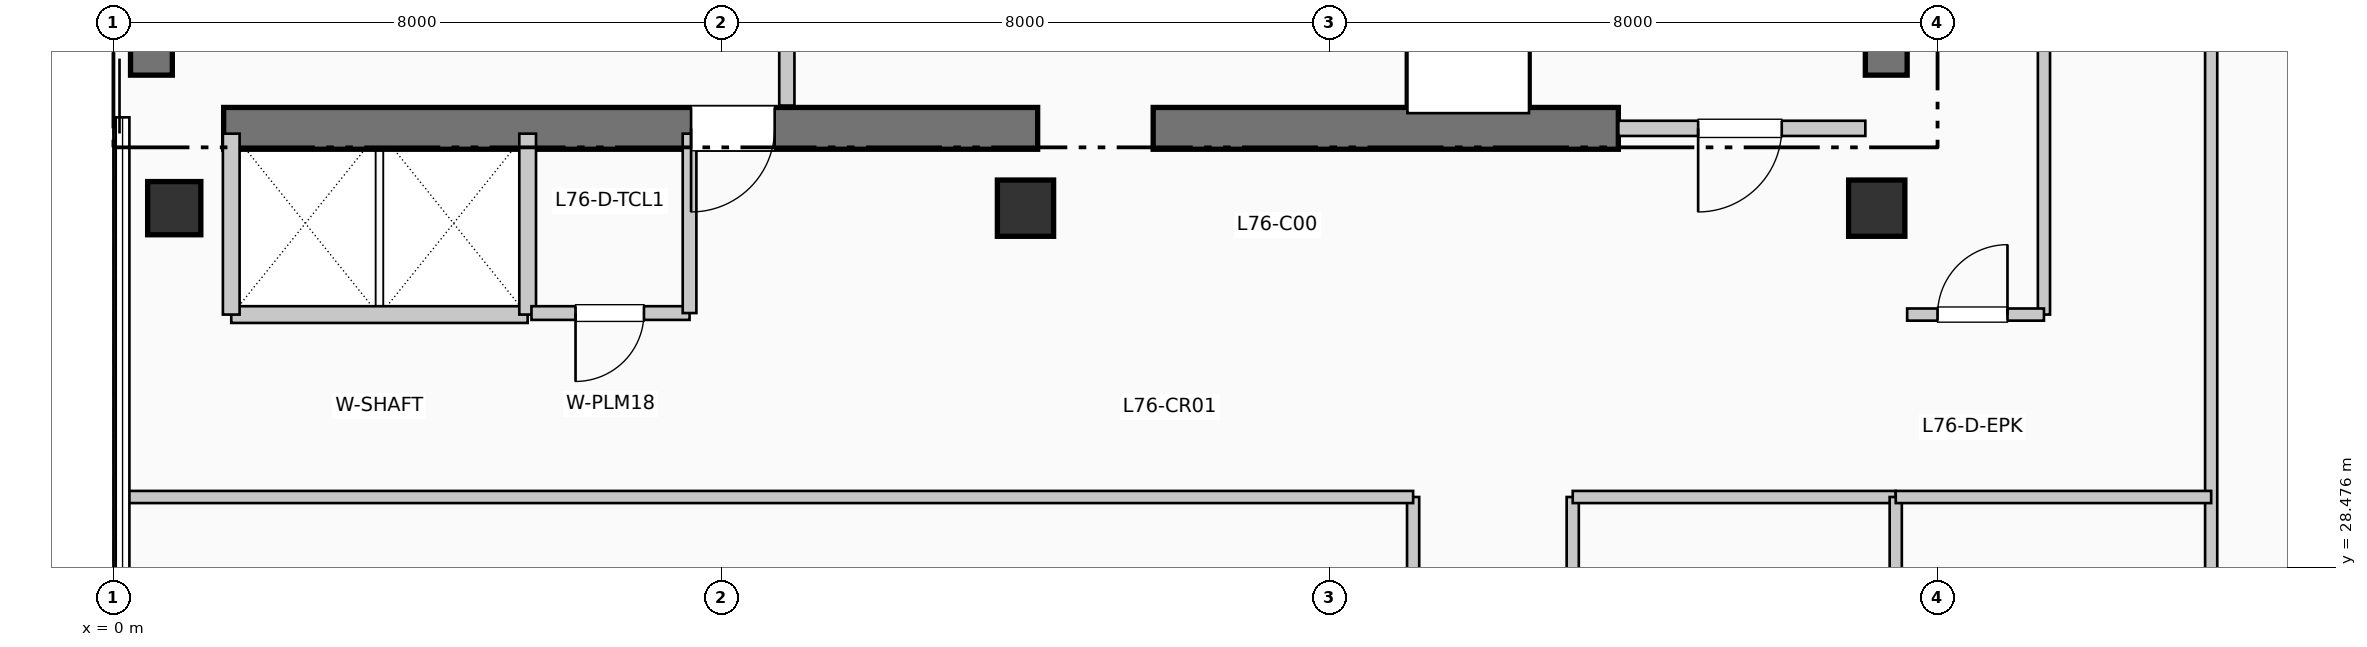
"""IFC4 building model, lengths in metres.
Left out: names, types, materials, properties, quantities, classifications, styles, units other than length and angle.
Written with IfcOpenShell. Run it as: python <this file> out.ifc"""

import sys

from ifc_helpers import new_model, si_unit, direction, frame, frame_2d, origin, origin_2d, place, context, subcontext, project, spatial, rectangle, extrude, element, fill, save


model = new_model("IFC4")
c1 = context("Model", 3, precision=1e-05, world=origin(), true_north=direction((0.0, 1.0)))
c2 = subcontext(c1, "Body", "Model", "MODEL_VIEW")
j1 = project(units=[si_unit("LENGTHUNIT", "METRE"), si_unit("PLANEANGLEUNIT", "RADIAN")], contexts=[c1])
p1 = place(None, origin())
s1 = spatial("IfcSite", under=j1, at=p1, CompositionType="ELEMENT")
p2 = place(p1, origin())
s2 = spatial("IfcBuilding", under=s1, at=p2, CompositionType="ELEMENT")
p3 = place(p2, frame((0.0, 0.0, 311.85)))
s3 = spatial("IfcBuildingStorey", under=s2, at=p3, CompositionType="ELEMENT", Elevation=311.85)
p4 = place(p3, frame((0.5, 34.95, 0.0), z_axis=(0.0, 0.0, 1.0), x_axis=(0.0, 1.0, 0.0)))
e1 = element("IfcWall", 1, at=p4, inside=s3, PredefinedType="SHEAR", context=c2, shape_type="SweptSolid", body=[
    extrude(rectangle(XDim=7.9, YDim=0.55, at=frame_2d((3.95, 0.0))), origin(), (0.0, 0.0, 1.0), 3.96),
])
p5 = place(p3, frame((23.325, 34.95, 0.0), z_axis=(0.0, 0.0, 1.0), x_axis=(0.0, 1.0, 0.0)))
e2 = element("IfcWall", 2, at=p5, inside=s3, PredefinedType="SHEAR", context=c2, shape_type="SweptSolid", body=[
    extrude(rectangle(XDim=10.64, YDim=0.55, at=frame_2d((5.32, 0.0))), origin(), (0.0, 0.0, 1.0), 3.96),
])
p6 = place(p3, frame((1.45, 34.25, 0.0), z_axis=(0.0, 0.0, 1.0), x_axis=(1.0, 0.0, 0.0)))
e3 = element("IfcWall", 3, at=p6, inside=s3, PredefinedType="SHEAR", context=c2, shape_type="SweptSolid", body=[
    extrude(rectangle(XDim=10.71, YDim=0.55, at=frame_2d((5.355, 0.0))), origin(), (0.0, 0.0, 1.0), 3.96),
])
p7 = place(p6, frame((7.25, 0.0, 0.0), z_axis=(0.0, 0.0, 1.0), x_axis=(-1.0, 0.0, 0.0)))
e4 = element("IfcOpeningElement", 4, at=p7, cuts=e3, PredefinedType="OPENING", context=c2, shape_type="SweptSolid", body=[
    extrude(rectangle(XDim=1.1, YDim=2.15, at=frame_2d((0.55, 1.075))), frame((0.0, 0.285, 0.0), z_axis=(0.0, -1.0, 0.0), x_axis=(1.0, 0.0, 0.0)), (0.0, 0.0, 1.0), 0.57),
])
p8 = place(p3, frame((13.68, 34.25, 0.0), z_axis=(0.0, 0.0, 1.0), x_axis=(1.0, 0.0, 0.0)))
e5 = element("IfcWall", 5, at=p8, inside=s3, PredefinedType="SHEAR", context=c2, shape_type="SweptSolid", body=[
    extrude(rectangle(XDim=6.12, YDim=0.55, at=frame_2d((3.06, 0.0))), origin(), (0.0, 0.0, 1.0), 3.96),
])
p9 = place(p3, frame((0.8, 33.2, 0.0), z_axis=(0.0, 0.0, 1.0), x_axis=(1.0, 0.0, 0.0)))
e6 = element("IfcColumn", 6, at=p9, inside=s3, PredefinedType="COLUMN", context=c2, shape_type="SweptSolid", body=[
    extrude(rectangle(XDim=0.7, YDim=0.7, at=origin_2d()), origin(), (0.0, 0.0, 1.0), 3.96),
])
for number, where, z_axis, x_axis in (
    (7, (12.0, 33.2, 0.0), (0.0, 0.0, 1.0), (1.0, 0.0, 0.0)),
    (8, (23.2, 33.2, 0.0), (0.0, 0.0, 1.0), (1.0, 0.0, 0.0)),
):
    element("IfcColumn", number, at=place(p3, frame(where, z_axis=z_axis, x_axis=x_axis)), inside=s3, PredefinedType="COLUMN", context=c2, shape_type="SweptSolid", body=[
        extrude(rectangle(XDim=0.74, YDim=0.74, at=origin_2d()), origin(), (0.0, 0.0, 1.0), 3.96),
    ])
p10 = place(p3, frame((8.86, 34.55, 0.0), z_axis=(0.0, 0.0, 1.0), x_axis=(0.0, 1.0, 0.0)))
e9 = element("IfcWall", 9, at=p10, inside=s3, PredefinedType="PARTITIONING", context=c2, shape_type="SweptSolid", body=[
    extrude(rectangle(XDim=2.5, YDim=0.2, at=frame_2d((1.25, 0.0))), origin(), (0.0, 0.0, 1.0), 3.74),
])
p11 = place(p3, frame((19.8, 34.25, 0.0), z_axis=(0.0, 0.0, 1.0), x_axis=(1.0, 0.0, 0.0)))
e10 = element("IfcWall", 10, at=p11, inside=s3, PredefinedType="PARTITIONING", context=c2, shape_type="SweptSolid", body=[
    extrude(rectangle(XDim=3.25, YDim=0.2, at=frame_2d((1.625, 0.0))), origin(), (0.0, 0.0, 1.0), 3.74),
])
p12 = place(p11, frame((2.15, 0.0, 0.0), z_axis=(0.0, 0.0, 1.0), x_axis=(-1.0, 0.0, 0.0)))
e11 = element("IfcOpeningElement", 11, at=p12, cuts=e10, PredefinedType="OPENING", context=c2, shape_type="SweptSolid", body=[
    extrude(rectangle(XDim=1.1, YDim=2.15, at=frame_2d((0.55, 1.075))), frame((0.0, 0.11, 0.0), z_axis=(0.0, -1.0, 0.0), x_axis=(1.0, 0.0, 0.0)), (0.0, 0.0, 1.0), 0.22),
])
p13 = place(p3, frame((1.55, 31.8, 0.0), z_axis=(0.0, 0.0, 1.0), x_axis=(1.0, 0.0, 0.0)))
e12 = element("IfcWall", 12, at=p13, inside=s3, PredefinedType="PARTITIONING", context=c2, shape_type="SweptSolid", body=[
    extrude(rectangle(XDim=3.9, YDim=0.22, at=frame_2d((1.95, 0.0))), origin(), (0.0, 0.0, 1.0), 3.74),
])
for number, where, z_axis, x_axis in (
    (13, (1.55, 31.8, 0.0), (0.0, 0.0, 1.0), (0.0, 1.0, 0.0)),
    (14, (5.45, 31.8, 0.0), (0.0, 0.0, 1.0), (0.0, 1.0, 0.0)),
):
    element("IfcWall", number, at=place(p3, frame(where, z_axis=z_axis, x_axis=x_axis)), inside=s3, PredefinedType="PARTITIONING", context=c2, shape_type="SweptSolid", body=[
        extrude(rectangle(XDim=2.38, YDim=0.22, at=frame_2d((1.19, 0.0))), origin(), (0.0, 0.0, 1.0), 3.74),
    ])
p14 = place(p3, frame((5.5, 31.82, 0.0), z_axis=(0.0, 0.0, 1.0), x_axis=(1.0, 0.0, 0.0)))
e15 = element("IfcWall", 15, at=p14, inside=s3, PredefinedType="PLUMBINGWALL", context=c2, shape_type="SweptSolid", body=[
    extrude(rectangle(XDim=2.08, YDim=0.18, at=frame_2d((1.04, 0.0))), origin(), (0.0, 0.0, 1.0), 3.74),
])
p15 = place(p14, frame((1.48, 0.0, 0.0), z_axis=(0.0, 0.0, 1.0), x_axis=(-1.0, 0.0, 0.0)))
e16 = element("IfcOpeningElement", 16, at=p15, cuts=e15, PredefinedType="OPENING", context=c2, shape_type="SweptSolid", body=[
    extrude(rectangle(XDim=0.9, YDim=2.1, at=frame_2d((0.45, 1.05))), frame((0.0, 0.1, 0.0), z_axis=(0.0, -1.0, 0.0), x_axis=(1.0, 0.0, 0.0)), (0.0, 0.0, 1.0), 0.2),
])
p16 = place(p3, frame((7.58, 31.82, 0.0), z_axis=(0.0, 0.0, 1.0), x_axis=(0.0, 1.0, 0.0)))
e17 = element("IfcWall", 17, at=p16, inside=s3, PredefinedType="PLUMBINGWALL", context=c2, shape_type="SweptSolid", body=[
    extrude(rectangle(XDim=2.36, YDim=0.18, at=frame_2d((1.18, 0.0))), origin(), (0.0, 0.0, 1.0), 3.74),
])
p17 = place(p3, frame((17.1, 11.04, 0.0), z_axis=(0.0, 0.0, 1.0), x_axis=(0.0, 1.0, 0.0)))
e18 = element("IfcWall", 18, at=p17, inside=s3, PredefinedType="PARTITIONING", context=c2, shape_type="SweptSolid", body=[
    extrude(rectangle(XDim=18.36, YDim=0.16, at=frame_2d((9.18, 0.0))), origin(), (0.0, 0.0, 1.0), 3.74),
])
p18 = place(p17, frame((2.311, 0.0, 0.0), z_axis=(0.0, 0.0, 1.0), x_axis=(-1.0, 0.0, 0.0)))
e19 = element("IfcOpeningElement", 19, at=p18, cuts=e18, PredefinedType="OPENING", context=c2, shape_type="SweptSolid", body=[
    extrude(rectangle(XDim=0.95, YDim=2.15, at=frame_2d((0.475, 1.075))), frame((0.0, 0.09, 0.0), z_axis=(0.0, -1.0, 0.0), x_axis=(1.0, 0.0, 0.0)), (0.0, 0.0, 1.0), 0.18),
])
p19 = place(p17, frame((6.167, 0.0, 0.0), z_axis=(0.0, 0.0, 1.0), x_axis=(-1.0, 0.0, 0.0)))
e20 = element("IfcOpeningElement", 20, at=p19, cuts=e18, PredefinedType="OPENING", context=c2, shape_type="SweptSolid", body=[
    extrude(rectangle(XDim=0.95, YDim=2.15, at=frame_2d((0.475, 1.075))), frame((0.0, 0.09, 0.0), z_axis=(0.0, -1.0, 0.0), x_axis=(1.0, 0.0, 0.0)), (0.0, 0.0, 1.0), 0.18),
])
p20 = place(p17, frame((10.298, 0.0, 0.0), z_axis=(0.0, 0.0, 1.0), x_axis=(-1.0, 0.0, 0.0)))
e21 = element("IfcOpeningElement", 21, at=p20, cuts=e18, PredefinedType="OPENING", context=c2, shape_type="SweptSolid", body=[
    extrude(rectangle(XDim=0.95, YDim=2.15, at=frame_2d((0.475, 1.075))), frame((0.0, 0.09, 0.0), z_axis=(0.0, -1.0, 0.0), x_axis=(1.0, 0.0, 0.0)), (0.0, 0.0, 1.0), 0.18),
])
p21 = place(p17, frame((14.153, 0.0, 0.0), z_axis=(0.0, 0.0, 1.0), x_axis=(-1.0, 0.0, 0.0)))
e22 = element("IfcOpeningElement", 22, at=p21, cuts=e18, PredefinedType="OPENING", context=c2, shape_type="SweptSolid", body=[
    extrude(rectangle(XDim=0.95, YDim=2.15, at=frame_2d((0.475, 1.075))), frame((0.0, 0.09, 0.0), z_axis=(0.0, -1.0, 0.0), x_axis=(1.0, 0.0, 0.0)), (0.0, 0.0, 1.0), 0.18),
])
p22 = place(p17, frame((17.366, 0.0, 0.0), z_axis=(0.0, 0.0, 1.0), x_axis=(-1.0, 0.0, 0.0)))
e23 = element("IfcOpeningElement", 23, at=p22, cuts=e18, PredefinedType="OPENING", context=c2, shape_type="SweptSolid", body=[
    extrude(rectangle(XDim=0.95, YDim=2.15, at=frame_2d((0.475, 1.075))), frame((0.0, 0.09, 0.0), z_axis=(0.0, -1.0, 0.0), x_axis=(1.0, 0.0, 0.0)), (0.0, 0.0, 1.0), 0.18),
])
p23 = place(p3, frame((19.2, 11.04, 0.0), z_axis=(0.0, 0.0, 1.0), x_axis=(0.0, 1.0, 0.0)))
e24 = element("IfcWall", 24, at=p23, inside=s3, PredefinedType="PARTITIONING", context=c2, shape_type="SweptSolid", body=[
    extrude(rectangle(XDim=18.36, YDim=0.16, at=frame_2d((9.18, 0.0))), origin(), (0.0, 0.0, 1.0), 3.74),
])
p24 = place(p23, frame((8.705, 0.0, 0.0)))
e25 = element("IfcOpeningElement", 25, at=p24, cuts=e24, PredefinedType="OPENING", context=c2, shape_type="SweptSolid", body=[
    extrude(rectangle(XDim=0.95, YDim=2.15, at=frame_2d((0.475, 1.075))), frame((0.0, 0.09, 0.0), z_axis=(0.0, -1.0, 0.0), x_axis=(1.0, 0.0, 0.0)), (0.0, 0.0, 1.0), 0.18),
])
p25 = place(p3, frame((0.19, 29.4, 0.0), z_axis=(0.0, 0.0, 1.0), x_axis=(1.0, 0.0, 0.0)))
e26 = element("IfcWall", 26, at=p25, inside=s3, PredefinedType="PARTITIONING", context=c2, shape_type="SweptSolid", body=[
    extrude(rectangle(XDim=16.91, YDim=0.16, at=frame_2d((8.455, 0.0))), origin(), (0.0, 0.0, 1.0), 3.425),
])
p26 = place(p3, frame((19.2, 29.4, 0.0), z_axis=(0.0, 0.0, 1.0), x_axis=(1.0, 0.0, 0.0)))
e27 = element("IfcWall", 27, at=p26, inside=s3, PredefinedType="PARTITIONING", context=c2, shape_type="SweptSolid", body=[
    extrude(rectangle(XDim=4.25, YDim=0.16, at=frame_2d((2.125, 0.0))), origin(), (0.0, 0.0, 1.0), 3.425),
])
p27 = place(p3, frame((23.45, 6.84, 0.0), z_axis=(0.0, 0.0, 1.0), x_axis=(0.0, 1.0, 0.0)))
e28 = element("IfcWall", 28, at=p27, inside=s3, PredefinedType="PARTITIONING", context=c2, shape_type="SweptSolid", body=[
    extrude(rectangle(XDim=22.56, YDim=0.16, at=frame_2d((11.28, 0.0))), origin(), (0.0, 0.0, 1.0), 3.175),
])
p28 = place(p3, frame((25.4, 31.8, 0.0), z_axis=(0.0, 0.0, 1.0), x_axis=(0.0, 1.0, 0.0)))
e29 = element("IfcWall", 29, at=p28, inside=s3, PredefinedType="PARTITIONING", context=c2, shape_type="SweptSolid", body=[
    extrude(rectangle(XDim=14.01, YDim=0.16, at=frame_2d((7.005, 0.0))), origin(), (0.0, 0.0, 1.0), 3.74),
])
p29 = place(p3, frame((27.6, 25.19, 0.0), z_axis=(0.0, 0.0, 1.0), x_axis=(0.0, 1.0, 0.0)))
e30 = element("IfcWall", 30, at=p29, inside=s3, PredefinedType="PARTITIONING", context=c2, shape_type="SweptSolid", body=[
    extrude(rectangle(XDim=12.01, YDim=0.16, at=frame_2d((6.005, 0.0))), origin(), (0.0, 0.0, 1.0), 3.74),
])
p30 = place(p29, frame((2.15, 0.0, 0.0), z_axis=(0.0, 0.0, 1.0), x_axis=(-1.0, 0.0, 0.0)))
e31 = element("IfcOpeningElement", 31, at=p30, cuts=e30, PredefinedType="OPENING", context=c2, shape_type="SweptSolid", body=[
    extrude(rectangle(XDim=0.95, YDim=2.15, at=frame_2d((0.475, 1.075))), frame((0.0, 0.09, 0.0), z_axis=(0.0, -1.0, 0.0), x_axis=(1.0, 0.0, 0.0)), (0.0, 0.0, 1.0), 0.18),
])
p31 = place(p3, frame((23.45, 29.4, 0.0), z_axis=(0.0, 0.0, 1.0), x_axis=(1.0, 0.0, 0.0)))
e32 = element("IfcWall", 32, at=p31, inside=s3, PredefinedType="PARTITIONING", context=c2, shape_type="SweptSolid", body=[
    extrude(rectangle(XDim=4.15, YDim=0.16, at=frame_2d((2.075, 0.0))), origin(), (0.0, 0.0, 1.0), 3.425),
])
p32 = place(p3, frame((23.6, 31.8, 0.0), z_axis=(0.0, 0.0, 1.0), x_axis=(1.0, 0.0, 0.0)))
e33 = element("IfcWall", 33, at=p32, inside=s3, PredefinedType="PARTITIONING", context=c2, shape_type="SweptSolid", body=[
    extrude(rectangle(XDim=1.8, YDim=0.16, at=frame_2d((0.9, 0.0))), origin(), (0.0, 0.0, 1.0), 3.74),
])
p33 = place(p32, frame((0.4, 0.0, 0.0)))
e34 = element("IfcOpeningElement", 34, at=p33, cuts=e33, PredefinedType="OPENING", context=c2, shape_type="SweptSolid", body=[
    extrude(rectangle(XDim=0.92, YDim=2.1, at=frame_2d((0.46, 1.05))), frame((0.0, 0.09, 0.0), z_axis=(0.0, -1.0, 0.0), x_axis=(1.0, 0.0, 0.0)), (0.0, 0.0, 1.0), 0.18),
])
p34 = place(p7, origin())
e35 = element("IfcDoor", 35, at=p34, inside=s3, OperationType="SINGLE_SWING_LEFT", PredefinedType="DOOR", context=c2, shape_type="SweptSolid", body=[
    extrude(rectangle(XDim=1.1, YDim=2.15, at=frame_2d((0.55, 1.075))), frame((0.0, 0.025, 0.0), z_axis=(0.0, -1.0, 0.0), x_axis=(1.0, 0.0, 0.0)), (0.0, 0.0, 1.0), 0.05),
])
fill(e4, e35)
p35 = place(p12, origin())
e36 = element("IfcDoor", 36, at=p35, inside=s3, OperationType="SINGLE_SWING_LEFT", PredefinedType="DOOR", context=c2, shape_type="SweptSolid", body=[
    extrude(rectangle(XDim=1.1, YDim=2.15, at=frame_2d((0.55, 1.075))), frame((0.0, 0.025, 0.0), z_axis=(0.0, -1.0, 0.0), x_axis=(1.0, 0.0, 0.0)), (0.0, 0.0, 1.0), 0.05),
])
fill(e11, e36)
p36 = place(p15, origin())
e37 = element("IfcDoor", 37, at=p36, inside=s3, OperationType="SINGLE_SWING_LEFT", PredefinedType="DOOR", context=c2, shape_type="SweptSolid", body=[
    extrude(rectangle(XDim=0.9, YDim=2.1, at=frame_2d((0.45, 1.05))), frame((0.0, 0.025, 0.0), z_axis=(0.0, -1.0, 0.0), x_axis=(1.0, 0.0, 0.0)), (0.0, 0.0, 1.0), 0.05),
])
fill(e16, e37)
p37 = place(p33, origin())
e38 = element("IfcDoor", 38, at=p37, inside=s3, OperationType="SINGLE_SWING_RIGHT", PredefinedType="DOOR", context=c2, shape_type="SweptSolid", body=[
    extrude(rectangle(XDim=0.92, YDim=2.1, at=frame_2d((0.46, 1.05))), frame((0.0, 0.025, 0.0), z_axis=(0.0, -1.0, 0.0), x_axis=(1.0, 0.0, 0.0)), (0.0, 0.0, 1.0), 0.05),
])
fill(e34, e38)
save(model, sys.argv[1])
